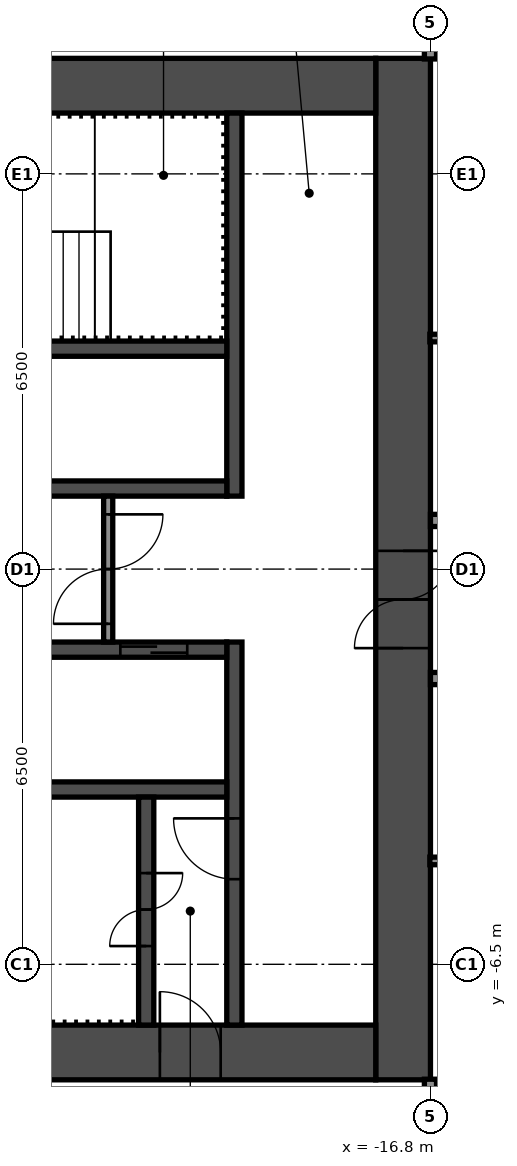
"""IFC4 building model, lengths in metres.
Left out: names, types, materials, properties, quantities, classifications, styles, units other than length and angle.
Written with IfcOpenShell. Run it as: python <this file> out.ifc"""

import sys

from ifc_helpers import new_model, si_unit, direction, frame, frame_2d, origin, place, context, subcontext, project, spatial, rectangle, extrude, element, fill, save


model = new_model("IFC4")
c1 = context("Model", 3, precision=1e-05, world=origin(), true_north=direction((0.0, 1.0)))
c2 = subcontext(c1, "Body", "Model", "MODEL_VIEW")
j1 = project(units=[si_unit("LENGTHUNIT", "METRE"), si_unit("PLANEANGLEUNIT", "RADIAN")], contexts=[c1])
p1 = place(None, origin())
s1 = spatial("IfcSite", under=j1, at=p1, CompositionType="ELEMENT")
p2 = place(p1, origin())
s2 = spatial("IfcBuilding", under=s1, at=p2, CompositionType="ELEMENT")
p3 = place(p2, frame((0.0, 0.0, 140.6)))
s3 = spatial("IfcBuildingStorey", under=s2, at=p3, CompositionType="ELEMENT", Elevation=140.6)
p4 = place(p3, frame((-17.25, -8.4, 0.0), z_axis=(0.0, 0.0, 1.0), x_axis=(0.0, 1.0, 0.0)))
e1 = element("IfcWall", 1, at=p4, inside=s3, PredefinedType="SHEAR", context=c2, shape_type="SweptSolid", body=[
    extrude(rectangle(XDim=16.8, YDim=0.9, at=frame_2d((8.4, 0.0))), origin(), (0.0, 0.0, 1.0), 2.75),
])
p5 = place(p4, frame((7.1, 0.0, 0.0)))
e2 = element("IfcOpeningElement", 2, at=p5, cuts=e1, PredefinedType="OPENING", context=c2, shape_type="SweptSolid", body=[
    extrude(rectangle(XDim=1.6, YDim=2.1, at=frame_2d((0.8, 1.05))), frame((0.0, 0.46, 0.0), z_axis=(0.0, -1.0, 0.0), x_axis=(1.0, 0.0, 0.0)), (0.0, 0.0, 1.0), 0.92),
])
p6 = place(p3, frame((-32.7, 7.95, 0.0), z_axis=(0.0, 0.0, 1.0), x_axis=(1.0, 0.0, 0.0)))
e3 = element("IfcWall", 3, at=p6, inside=s3, PredefinedType="SHEAR", context=c2, shape_type="SweptSolid", body=[
    extrude(rectangle(XDim=15.0, YDim=0.9, at=frame_2d((7.5, 0.0))), origin(), (0.0, 0.0, 1.0), 2.75),
])
p7 = place(p6, frame((3.4, 0.0, 0.0)))
e4 = element("IfcOpeningElement", 4, at=p7, cuts=e3, PredefinedType="OPENING", context=c2, shape_type="SweptSolid", body=[
    extrude(rectangle(XDim=1.2, YDim=2.1, at=frame_2d((0.6, 1.05))), frame((0.0, 0.46, 0.0), z_axis=(0.0, -1.0, 0.0), x_axis=(1.0, 0.0, 0.0)), (0.0, 0.0, 1.0), 0.92),
])
p8 = place(p6, frame((0.75, 0.0, 0.0)))
e5 = element("IfcOpeningElement", 5, at=p8, cuts=e3, PredefinedType="OPENING", context=c2, shape_type="SweptSolid", body=[
    extrude(rectangle(XDim=0.9, YDim=2.1, at=frame_2d((0.45, 1.05))), frame((0.0, 0.46, 0.0), z_axis=(0.0, -1.0, 0.0), x_axis=(1.0, 0.0, 0.0)), (0.0, 0.0, 1.0), 0.92),
])
p9 = place(p3, frame((-32.7, -7.95, 0.0), z_axis=(0.0, 0.0, 1.0), x_axis=(1.0, 0.0, 0.0)))
e6 = element("IfcWall", 6, at=p9, inside=s3, PredefinedType="SHEAR", context=c2, shape_type="SweptSolid", body=[
    extrude(rectangle(XDim=15.0, YDim=0.9, at=frame_2d((7.5, 0.0))), origin(), (0.0, 0.0, 1.0), 2.75),
])
p10 = place(p9, frame((11.45, 0.0, 0.0)))
e7 = element("IfcOpeningElement", 7, at=p10, cuts=e6, PredefinedType="OPENING", context=c2, shape_type="SweptSolid", body=[
    extrude(rectangle(XDim=1.0, YDim=2.1, at=frame_2d((0.5, 1.05))), frame((0.0, 0.46, 0.0), z_axis=(0.0, -1.0, 0.0), x_axis=(1.0, 0.0, 0.0)), (0.0, 0.0, 1.0), 0.92),
])
p11 = place(p3, frame((-20.025, 1.2, 0.0), z_axis=(0.0, 0.0, 1.0), x_axis=(0.0, 1.0, 0.0)))
e8 = element("IfcWall", 8, at=p11, inside=s3, PredefinedType="SHEAR", context=c2, shape_type="SweptSolid", body=[
    extrude(rectangle(XDim=6.3, YDim=0.25, at=frame_2d((3.15, 0.0))), origin(), (0.0, 0.0, 1.0), 2.75),
])
p12 = place(p3, frame((-20.025, -7.5, 0.0), z_axis=(0.0, 0.0, 1.0), x_axis=(0.0, 1.0, 0.0)))
e9 = element("IfcWall", 9, at=p12, inside=s3, PredefinedType="SHEAR", context=c2, shape_type="SweptSolid", body=[
    extrude(rectangle(XDim=6.3, YDim=0.25, at=frame_2d((3.15, 0.0))), origin(), (0.0, 0.0, 1.0), 2.75),
])
p13 = place(p12, frame((2.4, 0.0, 0.0)))
e10 = element("IfcOpeningElement", 10, at=p13, cuts=e9, PredefinedType="OPENING", context=c2, shape_type="SweptSolid", body=[
    extrude(rectangle(XDim=1.0, YDim=2.1, at=frame_2d((0.5, 1.05))), frame((0.0, 0.135, 0.0), z_axis=(0.0, -1.0, 0.0), x_axis=(1.0, 0.0, 0.0)), (0.0, 0.0, 1.0), 0.27),
])
p14 = place(p3, frame((-27.65, 1.325, 0.0), z_axis=(0.0, 0.0, 1.0), x_axis=(1.0, 0.0, 0.0)))
e11 = element("IfcWall", 11, at=p14, inside=s3, PredefinedType="SHEAR", context=c2, shape_type="SweptSolid", body=[
    extrude(rectangle(XDim=7.5, YDim=0.25, at=frame_2d((3.75, 0.0))), origin(), (0.0, 0.0, 1.0), 2.75),
])
p15 = place(p14, frame((3.425, 0.0, 0.0)))
e12 = element("IfcOpeningElement", 12, at=p15, cuts=e11, PredefinedType="OPENING", context=c2, shape_type="SweptSolid", body=[
    extrude(rectangle(XDim=0.9, YDim=2.1, at=frame_2d((0.45, 1.05))), frame((0.0, 0.135, 0.0), z_axis=(0.0, -1.0, 0.0), x_axis=(1.0, 0.0, 0.0)), (0.0, 0.0, 1.0), 0.27),
])
p16 = place(p3, frame((-27.65, 3.625, 0.0), z_axis=(0.0, 0.0, 1.0), x_axis=(1.0, 0.0, 0.0)))
e13 = element("IfcWall", 13, at=p16, inside=s3, PredefinedType="SHEAR", context=c2, shape_type="SweptSolid", body=[
    extrude(rectangle(XDim=7.5, YDim=0.25, at=frame_2d((3.75, 0.0))), origin(), (0.0, 0.0, 1.0), 2.75),
])
p17 = place(p3, frame((-27.65, -1.325, 0.0), z_axis=(0.0, 0.0, 1.0), x_axis=(1.0, 0.0, 0.0)))
e14 = element("IfcWall", 14, at=p17, inside=s3, PredefinedType="SHEAR", context=c2, shape_type="SweptSolid", body=[
    extrude(rectangle(XDim=7.5, YDim=0.25, at=frame_2d((3.75, 0.0))), origin(), (0.0, 0.0, 1.0), 2.75),
])
p18 = place(p17, frame((5.75, 0.0, 0.0)))
e15 = element("IfcOpeningElement", 15, at=p18, cuts=e14, PredefinedType="OPENING", context=c2, shape_type="SweptSolid", body=[
    extrude(rectangle(XDim=1.1, YDim=2.1, at=frame_2d((0.55, 1.05))), frame((0.0, 0.135, 0.0), z_axis=(0.0, -1.0, 0.0), x_axis=(1.0, 0.0, 0.0)), (0.0, 0.0, 1.0), 0.27),
])
p19 = place(p17, frame((3.35, 0.0, 0.0)))
e16 = element("IfcOpeningElement", 16, at=p19, cuts=e14, PredefinedType="OPENING", context=c2, shape_type="SweptSolid", body=[
    extrude(rectangle(XDim=1.1, YDim=2.1, at=frame_2d((0.55, 1.05))), frame((0.0, 0.135, 0.0), z_axis=(0.0, -1.0, 0.0), x_axis=(1.0, 0.0, 0.0)), (0.0, 0.0, 1.0), 0.27),
])
p20 = place(p17, frame((0.95, 0.0, 0.0)))
e17 = element("IfcOpeningElement", 17, at=p20, cuts=e14, PredefinedType="OPENING", context=c2, shape_type="SweptSolid", body=[
    extrude(rectangle(XDim=1.1, YDim=2.1, at=frame_2d((0.55, 1.05))), frame((0.0, 0.135, 0.0), z_axis=(0.0, -1.0, 0.0), x_axis=(1.0, 0.0, 0.0)), (0.0, 0.0, 1.0), 0.27),
])
p21 = place(p3, frame((-27.65, -3.625, 0.0), z_axis=(0.0, 0.0, 1.0), x_axis=(1.0, 0.0, 0.0)))
e18 = element("IfcWall", 18, at=p21, inside=s3, PredefinedType="SHEAR", context=c2, shape_type="SweptSolid", body=[
    extrude(rectangle(XDim=7.5, YDim=0.25, at=frame_2d((3.75, 0.0))), origin(), (0.0, 0.0, 1.0), 2.75),
])
p22 = place(p3, frame((-21.475, -7.5, 0.0), z_axis=(0.0, 0.0, 1.0), x_axis=(0.0, 1.0, 0.0)))
e19 = element("IfcWall", 19, at=p22, inside=s3, PredefinedType="SHEAR", context=c2, shape_type="SweptSolid", body=[
    extrude(rectangle(XDim=3.75, YDim=0.25, at=frame_2d((1.875, 0.0))), origin(), (0.0, 0.0, 1.0), 2.75),
])
p23 = place(p22, frame((1.3, 0.0, 0.0)))
e20 = element("IfcOpeningElement", 20, at=p23, cuts=e19, PredefinedType="OPENING", context=c2, shape_type="SweptSolid", body=[
    extrude(rectangle(XDim=1.2, YDim=2.1, at=frame_2d((0.6, 1.05))), frame((0.0, 0.135, 0.0), z_axis=(0.0, -1.0, 0.0), x_axis=(1.0, 0.0, 0.0)), (0.0, 0.0, 1.0), 0.27),
])
p24 = place(p3, frame((-22.1, -1.2, 0.0), z_axis=(0.0, 0.0, 1.0), x_axis=(0.0, 1.0, 0.0)))
e21 = element("IfcWall", 21, at=p24, inside=s3, PredefinedType="PARTITIONING", context=c2, shape_type="SweptSolid", body=[
    extrude(rectangle(XDim=2.4, YDim=0.15, at=frame_2d((1.2, 0.0))), origin(), (0.0, 0.0, 1.0), 2.75),
])
p25 = place(p24, frame((0.3, 0.0, 0.0)))
e22 = element("IfcOpeningElement", 22, at=p25, cuts=e21, PredefinedType="OPENING", context=c2, shape_type="SweptSolid", body=[
    extrude(rectangle(XDim=1.8, YDim=2.1, at=frame_2d((0.9, 1.05))), frame((0.0, 0.085, 0.0), z_axis=(0.0, -1.0, 0.0), x_axis=(1.0, 0.0, 0.0)), (0.0, 0.0, 1.0), 0.17),
])
p26 = place(p3, frame((-16.81, -4.8, 0.0), z_axis=(0.0, 0.0, 1.0), x_axis=(1.0, 0.0, 0.0)))
e23 = element("IfcWall", 23, at=p26, inside=s3, PredefinedType="PARTITIONING", context=c2, shape_type="SweptSolid", body=[
    extrude(rectangle(XDim=2.448, YDim=0.125, at=frame_2d((1.224, 0.0))), origin(), (0.0, 0.0, 1.0), 2.75),
])
p27 = place(p3, frame((-16.8, -1.8, 0.0), z_axis=(0.0, 0.0, 1.0), x_axis=(1.0, 0.0, 0.0)))
e24 = element("IfcWall", 24, at=p27, inside=s3, PredefinedType="PARTITIONING", context=c2, shape_type="SweptSolid", body=[
    extrude(rectangle(XDim=33.6, YDim=0.2, at=frame_2d((16.8, 0.0))), origin(), (0.0, 0.0, 1.0), 2.75),
])
p28 = place(p27, frame((2.85, 0.0, 0.0)))
e25 = element("IfcOpeningElement", 25, at=p28, cuts=e24, PredefinedType="OPENING", context=c2, shape_type="SweptSolid", body=[
    extrude(rectangle(XDim=1.0, YDim=2.1, at=frame_2d((0.5, 1.05))), frame((0.0, 0.11, 0.0), z_axis=(0.0, -1.0, 0.0), x_axis=(1.0, 0.0, 0.0)), (0.0, 0.0, 1.0), 0.22),
])
p29 = place(p27, frame((4.55, 0.0, 0.0)))
e26 = element("IfcOpeningElement", 26, at=p29, cuts=e24, PredefinedType="OPENING", context=c2, shape_type="SweptSolid", body=[
    extrude(rectangle(XDim=1.0, YDim=2.1, at=frame_2d((0.5, 1.05))), frame((0.0, 0.11, 0.0), z_axis=(0.0, -1.0, 0.0), x_axis=(1.0, 0.0, 0.0)), (0.0, 0.0, 1.0), 0.22),
])
p30 = place(p27, frame((12.1, 0.0, 0.0)))
e27 = element("IfcOpeningElement", 27, at=p30, cuts=e24, PredefinedType="OPENING", context=c2, shape_type="SweptSolid", body=[
    extrude(rectangle(XDim=1.0, YDim=2.1, at=frame_2d((0.5, 1.05))), frame((0.0, 0.11, 0.0), z_axis=(0.0, -1.0, 0.0), x_axis=(1.0, 0.0, 0.0)), (0.0, 0.0, 1.0), 0.22),
])
p31 = place(p27, frame((19.65, 0.0, 0.0)))
e28 = element("IfcOpeningElement", 28, at=p31, cuts=e24, PredefinedType="OPENING", context=c2, shape_type="SweptSolid", body=[
    extrude(rectangle(XDim=1.0, YDim=2.1, at=frame_2d((0.5, 1.05))), frame((0.0, 0.11, 0.0), z_axis=(0.0, -1.0, 0.0), x_axis=(1.0, 0.0, 0.0)), (0.0, 0.0, 1.0), 0.22),
])
p32 = place(p27, frame((21.35, 0.0, 0.0)))
e29 = element("IfcOpeningElement", 29, at=p32, cuts=e24, PredefinedType="OPENING", context=c2, shape_type="SweptSolid", body=[
    extrude(rectangle(XDim=1.0, YDim=2.1, at=frame_2d((0.5, 1.05))), frame((0.0, 0.11, 0.0), z_axis=(0.0, -1.0, 0.0), x_axis=(1.0, 0.0, 0.0)), (0.0, 0.0, 1.0), 0.22),
])
p33 = place(p27, frame((27.2, 0.0, 0.0)))
e30 = element("IfcOpeningElement", 30, at=p33, cuts=e24, PredefinedType="OPENING", context=c2, shape_type="SweptSolid", body=[
    extrude(rectangle(XDim=1.0, YDim=2.1, at=frame_2d((0.5, 1.05))), frame((0.0, 0.11, 0.0), z_axis=(0.0, -1.0, 0.0), x_axis=(1.0, 0.0, 0.0)), (0.0, 0.0, 1.0), 0.22),
])
p34 = place(p3, frame((-16.8, 0.8, 0.0), z_axis=(0.0, 0.0, 1.0), x_axis=(1.0, 0.0, 0.0)))
e31 = element("IfcWall", 31, at=p34, inside=s3, PredefinedType="PARTITIONING", context=c2, shape_type="SweptSolid", body=[
    extrude(rectangle(XDim=33.6, YDim=0.2, at=frame_2d((16.8, 0.0))), origin(), (0.0, 0.0, 1.0), 2.75),
])
p35 = place(p34, frame((2.85, 0.0, 0.0)))
e32 = element("IfcOpeningElement", 32, at=p35, cuts=e31, PredefinedType="OPENING", context=c2, shape_type="SweptSolid", body=[
    extrude(rectangle(XDim=1.0, YDim=2.1, at=frame_2d((0.5, 1.05))), frame((0.0, 0.11, 0.0), z_axis=(0.0, -1.0, 0.0), x_axis=(1.0, 0.0, 0.0)), (0.0, 0.0, 1.0), 0.22),
])
p36 = place(p34, frame((4.55, 0.0, 0.0)))
e33 = element("IfcOpeningElement", 33, at=p36, cuts=e31, PredefinedType="OPENING", context=c2, shape_type="SweptSolid", body=[
    extrude(rectangle(XDim=1.0, YDim=2.1, at=frame_2d((0.5, 1.05))), frame((0.0, 0.11, 0.0), z_axis=(0.0, -1.0, 0.0), x_axis=(1.0, 0.0, 0.0)), (0.0, 0.0, 1.0), 0.22),
])
p37 = place(p34, frame((13.8, 0.0, 0.0)))
e34 = element("IfcOpeningElement", 34, at=p37, cuts=e31, PredefinedType="OPENING", context=c2, shape_type="SweptSolid", body=[
    extrude(rectangle(XDim=1.0, YDim=2.1, at=frame_2d((0.5, 1.05))), frame((0.0, 0.11, 0.0), z_axis=(0.0, -1.0, 0.0), x_axis=(1.0, 0.0, 0.0)), (0.0, 0.0, 1.0), 0.22),
])
p38 = place(p34, frame((19.65, 0.0, 0.0)))
e35 = element("IfcOpeningElement", 35, at=p38, cuts=e31, PredefinedType="OPENING", context=c2, shape_type="SweptSolid", body=[
    extrude(rectangle(XDim=1.0, YDim=2.1, at=frame_2d((0.5, 1.05))), frame((0.0, 0.11, 0.0), z_axis=(0.0, -1.0, 0.0), x_axis=(1.0, 0.0, 0.0)), (0.0, 0.0, 1.0), 0.22),
])
p39 = place(p34, frame((21.35, 0.0, 0.0)))
e36 = element("IfcOpeningElement", 36, at=p39, cuts=e31, PredefinedType="OPENING", context=c2, shape_type="SweptSolid", body=[
    extrude(rectangle(XDim=1.0, YDim=2.1, at=frame_2d((0.5, 1.05))), frame((0.0, 0.11, 0.0), z_axis=(0.0, -1.0, 0.0), x_axis=(1.0, 0.0, 0.0)), (0.0, 0.0, 1.0), 0.22),
])
p40 = place(p34, frame((27.1, 0.0, 0.0)))
e37 = element("IfcOpeningElement", 37, at=p40, cuts=e31, PredefinedType="OPENING", context=c2, shape_type="SweptSolid", body=[
    extrude(rectangle(XDim=1.0, YDim=2.1, at=frame_2d((0.5, 1.05))), frame((0.0, 0.11, 0.0), z_axis=(0.0, -1.0, 0.0), x_axis=(1.0, 0.0, 0.0)), (0.0, 0.0, 1.0), 0.22),
])
p41 = place(p3, frame((-16.81, 3.8, 0.0), z_axis=(0.0, 0.0, 1.0), x_axis=(1.0, 0.0, 0.0)))
e38 = element("IfcWall", 38, at=p41, inside=s3, PredefinedType="PARTITIONING", context=c2, shape_type="SweptSolid", body=[
    extrude(rectangle(XDim=2.448, YDim=0.125, at=frame_2d((1.224, 0.0))), origin(), (0.0, 0.0, 1.0), 2.75),
])
p42 = place(p3, frame((-16.8, -19.3, 0.0), z_axis=(0.0, 0.0, 1.0), x_axis=(0.0, 1.0, 0.0)))
e39 = element("IfcWall", 39, at=p42, inside=s3, PredefinedType="PARTITIONING", context=c2, shape_type="SweptSolid", body=[
    extrude(rectangle(XDim=10.91, YDim=0.2, at=frame_2d((5.455, 0.0))), origin(), (0.0, 0.0, 1.0), 2.75),
])
p43 = place(p3, frame((-16.8, 8.39, 0.0), z_axis=(0.0, 0.0, 1.0), x_axis=(0.0, 1.0, 0.0)))
e40 = element("IfcWall", 40, at=p43, inside=s3, PredefinedType="PARTITIONING", context=c2, shape_type="SweptSolid", body=[
    extrude(rectangle(XDim=9.91, YDim=0.2, at=frame_2d((4.955, 0.0))), origin(), (0.0, 0.0, 1.0), 2.75),
])
p44 = place(p5, origin())
e41 = element("IfcDoor", 41, at=p44, inside=s3, OperationType="DOUBLE_DOOR_SINGLE_SWING", PredefinedType="DOOR", context=c2, shape_type="SweptSolid", body=[
    extrude(rectangle(XDim=1.6, YDim=2.1, at=frame_2d((0.8, 1.05))), frame((0.0, 0.025, 0.0), z_axis=(0.0, -1.0, 0.0), x_axis=(1.0, 0.0, 0.0)), (0.0, 0.0, 1.0), 0.05),
])
fill(e2, e41)
p45 = place(p10, origin())
e42 = element("IfcDoor", 42, at=p45, inside=s3, OperationType="SINGLE_SWING_RIGHT", PredefinedType="DOOR", context=c2, shape_type="SweptSolid", body=[
    extrude(rectangle(XDim=1.0, YDim=2.1, at=frame_2d((0.5, 1.05))), frame((0.0, 0.025, 0.0), z_axis=(0.0, -1.0, 0.0), x_axis=(1.0, 0.0, 0.0)), (0.0, 0.0, 1.0), 0.05),
])
fill(e7, e42)
p46 = place(p23, origin())
e43 = element("IfcDoor", 43, at=p46, inside=s3, OperationType="DOUBLE_DOOR_SINGLE_SWING", PredefinedType="DOOR", context=c2, shape_type="SweptSolid", body=[
    extrude(rectangle(XDim=1.2, YDim=2.1, at=frame_2d((0.6, 1.05))), frame((0.0, 0.025, 0.0), z_axis=(0.0, -1.0, 0.0), x_axis=(1.0, 0.0, 0.0)), (0.0, 0.0, 1.0), 0.05),
])
fill(e20, e43)
p47 = place(p13, origin())
e44 = element("IfcDoor", 44, at=p47, inside=s3, OperationType="SINGLE_SWING_LEFT", PredefinedType="DOOR", context=c2, shape_type="SweptSolid", body=[
    extrude(rectangle(XDim=1.0, YDim=2.1, at=frame_2d((0.5, 1.05))), frame((0.0, 0.025, 0.0), z_axis=(0.0, -1.0, 0.0), x_axis=(1.0, 0.0, 0.0)), (0.0, 0.0, 1.0), 0.05),
])
fill(e10, e44)
p48 = place(p25, origin())
e45 = element("IfcDoor", 45, at=p48, inside=s3, OperationType="DOUBLE_DOOR_SINGLE_SWING", PredefinedType="DOOR", context=c2, shape_type="SweptSolid", body=[
    extrude(rectangle(XDim=1.8, YDim=2.1, at=frame_2d((0.9, 1.05))), frame((0.0, 0.025, 0.0), z_axis=(0.0, -1.0, 0.0), x_axis=(1.0, 0.0, 0.0)), (0.0, 0.0, 1.0), 0.05),
])
fill(e22, e45)
p49 = place(p18, origin())
e46 = element("IfcDoor", 46, at=p49, inside=s3, OperationType="DOUBLE_DOOR_SLIDING", PredefinedType="DOOR", context=c2, shape_type="SweptSolid", body=[
    extrude(rectangle(XDim=1.1, YDim=2.1, at=frame_2d((0.55, 1.05))), frame((0.0, 0.025, 0.0), z_axis=(0.0, -1.0, 0.0), x_axis=(1.0, 0.0, 0.0)), (0.0, 0.0, 1.0), 0.05),
])
fill(e15, e46)
save(model, sys.argv[1])
